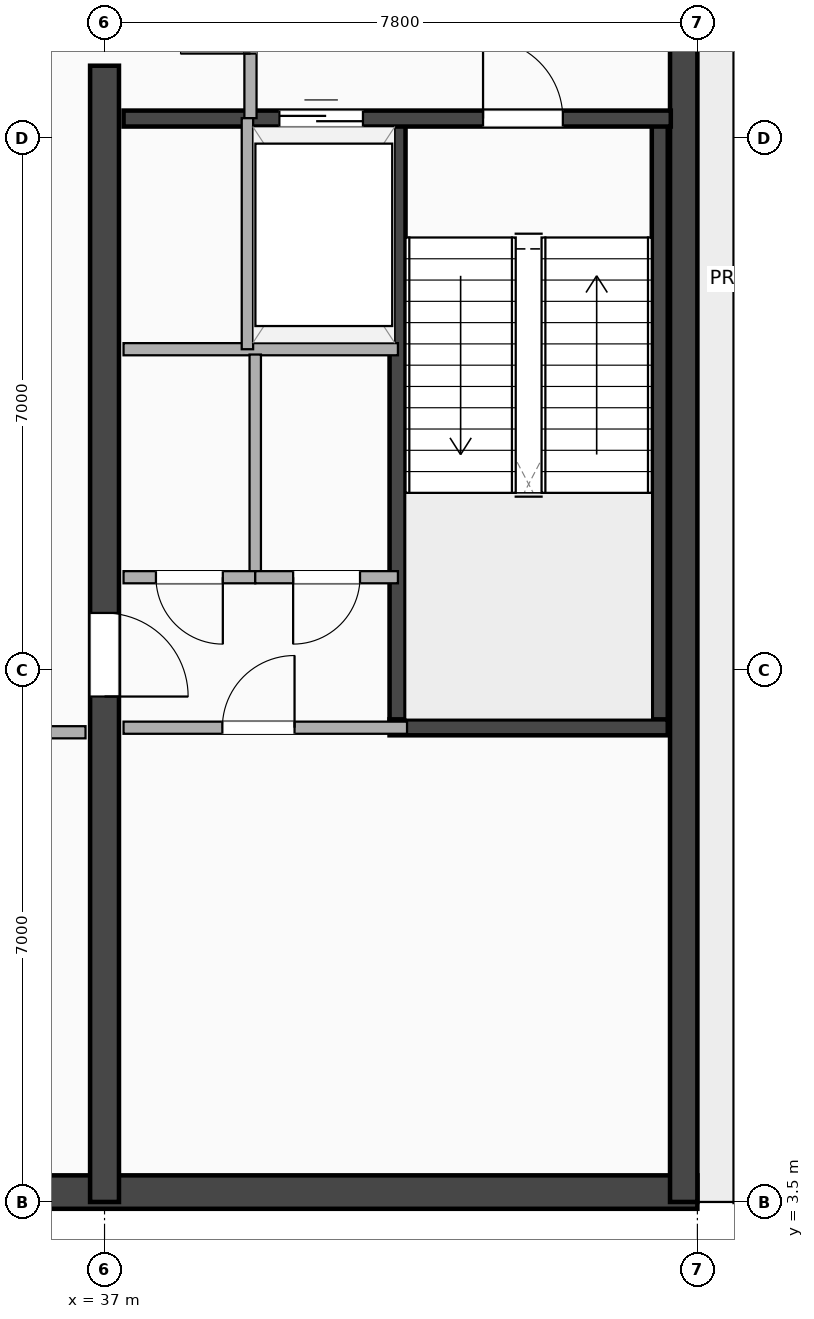
"""IFC4 building model, lengths in metres.
Left out: names, types, materials, properties, quantities, classifications, styles, units other than length and angle.
Written with IfcOpenShell. Run it as: python <this file> out.ifc"""

import sys

from ifc_helpers import new_model, si_unit, direction, frame, frame_2d, origin, place, context, subcontext, project, spatial, rectangle, extrude, element, fill, save


model = new_model("IFC4")
c1 = context("Model", 3, precision=1e-05, world=origin(), true_north=direction((0.0, 1.0)))
c2 = subcontext(c1, "Body", "Model", "MODEL_VIEW")
j1 = project(units=[si_unit("LENGTHUNIT", "METRE"), si_unit("PLANEANGLEUNIT", "RADIAN")], contexts=[c1])
p1 = place(None, origin())
s1 = spatial("IfcSite", under=j1, at=p1, CompositionType="ELEMENT")
p2 = place(p1, origin())
s2 = spatial("IfcBuilding", under=s1, at=p2, CompositionType="ELEMENT")
p3 = place(p2, frame((0.0, 0.0, 307.9)))
s3 = spatial("IfcBuildingStorey", under=s2, at=p3, CompositionType="ELEMENT", Elevation=307.9)
p4 = place(p3, frame((20.3, 3.63, 0.0), z_axis=(0.0, 0.0, 1.0), x_axis=(1.0, 0.0, 0.0)))
e1 = element("IfcWall", 1, at=p4, inside=s3, PredefinedType="SHEAR", context=c2, shape_type="SweptSolid", body=[
    extrude(rectangle(XDim=24.5, YDim=0.44, at=frame_2d((12.25, 0.0))), origin(), (0.0, 0.0, 1.0), 4.3),
])
p5 = place(p3, frame((44.62, 3.5, 0.0), z_axis=(0.0, 0.0, 1.0), x_axis=(0.0, 1.0, 0.0)))
e2 = element("IfcWall", 2, at=p5, inside=s3, PredefinedType="SHEAR", context=c2, shape_type="SweptSolid", body=[
    extrude(rectangle(XDim=22.3, YDim=0.36, at=frame_2d((11.15, 0.0))), origin(), (0.0, 0.0, 1.0), 4.3),
])
p6 = place(p3, frame((37.0, 3.5, 0.0), z_axis=(0.0, 0.0, 1.0), x_axis=(0.0, 1.0, 0.0)))
e3 = element("IfcWall", 3, at=p6, inside=s3, PredefinedType="SHEAR", context=c2, shape_type="SweptSolid", body=[
    extrude(rectangle(XDim=14.95, YDim=0.38, at=frame_2d((7.475, 0.0))), origin(), (0.0, 0.0, 1.0), 4.3),
])
p7 = place(p6, frame((6.65, 0.0, 0.0)))
e4 = element("IfcOpeningElement", 4, at=p7, cuts=e3, PredefinedType="OPENING", context=c2, shape_type="SweptSolid", body=[
    extrude(rectangle(XDim=1.1, YDim=2.15, at=frame_2d((0.55, 1.075))), frame((0.0, 0.2, 0.0), z_axis=(0.0, -1.0, 0.0), x_axis=(1.0, 0.0, 0.0)), (0.0, 0.0, 1.0), 0.4),
])
for number, where, z_axis, x_axis in (
    (5, (40.855, 9.745, 0.0), (0.0, 0.0, 1.0), (0.0, 1.0, 0.0)),
    (6, (44.305, 9.745, 0.0), (0.0, 0.0, 1.0), (0.0, 1.0, 0.0)),
):
    element("IfcWall", number, at=place(p3, frame(where, z_axis=z_axis, x_axis=x_axis)), inside=s3, PredefinedType="SHEAR", context=c2, shape_type="SweptSolid", body=[
        extrude(rectangle(XDim=8.01, YDim=0.21, at=frame_2d((4.005, 0.0))), origin(), (0.0, 0.0, 1.0), 4.3),
    ])
p8 = place(p3, frame((40.75, 9.745, 0.0), z_axis=(0.0, 0.0, 1.0), x_axis=(1.0, 0.0, 0.0)))
e7 = element("IfcWall", 7, at=p8, inside=s3, PredefinedType="SHEAR", context=c2, shape_type="SweptSolid", body=[
    extrude(rectangle(XDim=3.66, YDim=0.21, at=frame_2d((1.83, 0.0))), origin(), (0.0, 0.0, 1.0), 4.3),
])
p9 = place(p3, frame((37.25, 17.755, 0.0), z_axis=(0.0, 0.0, 1.0), x_axis=(1.0, 0.0, 0.0)))
e8 = element("IfcWall", 8, at=p9, inside=s3, PredefinedType="SHEAR", context=c2, shape_type="SweptSolid", body=[
    extrude(rectangle(XDim=7.2, YDim=0.21, at=frame_2d((3.6, 0.0))), origin(), (0.0, 0.0, 1.0), 4.3),
])
p10 = place(p9, frame((2.05, 0.0, 0.0)))
e9 = element("IfcOpeningElement", 9, at=p10, cuts=e8, PredefinedType="OPENING", context=c2, shape_type="SweptSolid", body=[
    extrude(rectangle(XDim=1.1, YDim=2.18, at=frame_2d((0.55, 1.09))), frame((0.0, 0.115, 0.0), z_axis=(0.0, -1.0, 0.0), x_axis=(1.0, 0.0, 0.0)), (0.0, 0.0, 1.0), 0.23),
])
p11 = place(p9, frame((5.78, 0.0, 0.0), z_axis=(0.0, 0.0, 1.0), x_axis=(-1.0, 0.0, 0.0)))
e10 = element("IfcOpeningElement", 10, at=p11, cuts=e8, PredefinedType="OPENING", context=c2, shape_type="SweptSolid", body=[
    extrude(rectangle(XDim=1.05, YDim=2.15, at=frame_2d((0.525, 1.075))), frame((0.0, 0.115, 0.0), z_axis=(0.0, -1.0, 0.0), x_axis=(1.0, 0.0, 0.0)), (0.0, 0.0, 1.0), 0.23),
])
p12 = place(p3, frame((45.41, 3.5, 0.0), z_axis=(0.0, 0.0, 1.0), x_axis=(0.0, 1.0, 0.0)))
e11 = element("IfcWall", 11, at=p12, inside=s3, PredefinedType="PARAPET", context=c2, shape_type="SweptSolid", body=[
    extrude(rectangle(XDim=23.6, YDim=0.24, at=frame_2d((11.8, 0.0))), origin(), (0.0, 0.0, 1.0), 1.25),
])
p13 = place(p3, frame((38.92, 17.76, 0.0), z_axis=(0.0, 0.0, 1.0), x_axis=(0.0, 1.0, 0.0)))
e12 = element("IfcWall", 12, at=p13, inside=s3, PredefinedType="PARTITIONING", context=c2, shape_type="SweptSolid", body=[
    extrude(rectangle(XDim=2.66, YDim=0.16, at=frame_2d((1.33, 0.0))), origin(), (0.0, 0.0, 1.0), 4.3),
])
p14 = place(p13, frame((1.77, 0.0, 0.0), z_axis=(0.0, 0.0, 1.0), x_axis=(-1.0, 0.0, 0.0)))
e13 = element("IfcOpeningElement", 13, at=p14, cuts=e12, PredefinedType="OPENING", context=c2, shape_type="SweptSolid", body=[
    extrude(rectangle(XDim=0.92, YDim=2.08, at=frame_2d((0.46, 1.04))), frame((0.0, 0.09, 0.0), z_axis=(0.0, -1.0, 0.0), x_axis=(1.0, 0.0, 0.0)), (0.0, 0.0, 1.0), 0.18),
])
p15 = place(p3, frame((37.25, 14.72, 0.0), z_axis=(0.0, 0.0, 1.0), x_axis=(1.0, 0.0, 0.0)))
e14 = element("IfcWall", 14, at=p15, inside=s3, PredefinedType="PARTITIONING", context=c2, shape_type="SweptSolid", body=[
    extrude(rectangle(XDim=3.61, YDim=0.16, at=frame_2d((1.805, 0.0))), origin(), (0.0, 0.0, 1.0), 4.3),
])
p16 = place(p3, frame((38.88, 14.72, 0.0), z_axis=(0.0, 0.0, 1.0), x_axis=(0.0, 1.0, 0.0)))
e15 = element("IfcWall", 15, at=p16, inside=s3, PredefinedType="PARTITIONING", context=c2, shape_type="SweptSolid", body=[
    extrude(rectangle(XDim=3.04, YDim=0.15, at=frame_2d((1.52, 0.0))), origin(), (0.0, 0.0, 1.0), 4.3),
])
p17 = place(p3, frame((38.983, 11.72, 0.0), z_axis=(0.0, 0.0, 1.0), x_axis=(0.0, 1.0, 0.0)))
e16 = element("IfcWall", 16, at=p17, inside=s3, PredefinedType="PARTITIONING", context=c2, shape_type="SweptSolid", body=[
    extrude(rectangle(XDim=2.93, YDim=0.15, at=frame_2d((1.465, 0.0))), origin(), (0.0, 0.0, 1.0), 4.3),
])
p18 = place(p3, frame((37.25, 11.72, 0.0), z_axis=(0.0, 0.0, 1.0), x_axis=(1.0, 0.0, 0.0)))
e17 = element("IfcWall", 17, at=p18, inside=s3, PredefinedType="PARTITIONING", context=c2, shape_type="SweptSolid", body=[
    extrude(rectangle(XDim=1.733, YDim=0.16, at=frame_2d((0.866, 0.0))), origin(), (0.0, 0.0, 1.0), 4.3),
])
p19 = place(p18, frame((0.427, 0.0, 0.0)))
e18 = element("IfcOpeningElement", 18, at=p19, cuts=e17, PredefinedType="OPENING", context=c2, shape_type="SweptSolid", body=[
    extrude(rectangle(XDim=0.88, YDim=2.08, at=frame_2d((0.44, 1.04))), frame((0.0, 0.09, 0.0), z_axis=(0.0, -1.0, 0.0), x_axis=(1.0, 0.0, 0.0)), (0.0, 0.0, 1.0), 0.18),
])
p20 = place(p3, frame((38.983, 11.72, 0.0), z_axis=(0.0, 0.0, 1.0), x_axis=(1.0, 0.0, 0.0)))
e19 = element("IfcWall", 19, at=p20, inside=s3, PredefinedType="PARTITIONING", context=c2, shape_type="SweptSolid", body=[
    extrude(rectangle(XDim=1.877, YDim=0.16, at=frame_2d((0.938, 0.0))), origin(), (0.0, 0.0, 1.0), 4.3),
])
p21 = place(p20, frame((0.499, 0.0, 0.0)))
e20 = element("IfcOpeningElement", 20, at=p21, cuts=e19, PredefinedType="OPENING", context=c2, shape_type="SweptSolid", body=[
    extrude(rectangle(XDim=0.88, YDim=2.08, at=frame_2d((0.44, 1.04))), frame((0.0, 0.09, 0.0), z_axis=(0.0, -1.0, 0.0), x_axis=(1.0, 0.0, 0.0)), (0.0, 0.0, 1.0), 0.18),
])
p22 = place(p3, frame((37.25, 9.74, 0.0), z_axis=(0.0, 0.0, 1.0), x_axis=(1.0, 0.0, 0.0)))
e21 = element("IfcWall", 21, at=p22, inside=s3, PredefinedType="PARTITIONING", context=c2, shape_type="SweptSolid", body=[
    extrude(rectangle(XDim=3.73, YDim=0.16, at=frame_2d((1.865, 0.0))), origin(), (0.0, 0.0, 1.0), 4.3),
])
p23 = place(p22, frame((2.25, 0.0, 0.0), z_axis=(0.0, 0.0, 1.0), x_axis=(-1.0, 0.0, 0.0)))
e22 = element("IfcOpeningElement", 22, at=p23, cuts=e21, PredefinedType="OPENING", context=c2, shape_type="SweptSolid", body=[
    extrude(rectangle(XDim=0.95, YDim=2.15, at=frame_2d((0.475, 1.075))), frame((0.0, 0.09, 0.0), z_axis=(0.0, -1.0, 0.0), x_axis=(1.0, 0.0, 0.0)), (0.0, 0.0, 1.0), 0.18),
])
p24 = place(p3, frame((29.45, 9.68, 0.0), z_axis=(0.0, 0.0, 1.0), x_axis=(1.0, 0.0, 0.0)))
e23 = element("IfcWall", 23, at=p24, inside=s3, PredefinedType="PARTITIONING", context=c2, shape_type="SweptSolid", body=[
    extrude(rectangle(XDim=7.3, YDim=0.16, at=frame_2d((3.65, 0.0))), origin(), (0.0, 0.0, 1.0), 4.3),
])
p25 = place(p24, frame((4.11, 0.0, 0.0), z_axis=(0.0, 0.0, 1.0), x_axis=(-1.0, 0.0, 0.0)))
e24 = element("IfcOpeningElement", 24, at=p25, cuts=e23, PredefinedType="OPENING", context=c2, shape_type="SweptSolid", body=[
    extrude(rectangle(XDim=0.92, YDim=2.08, at=frame_2d((0.46, 1.04))), frame((0.0, 0.09, 0.0), z_axis=(0.0, -1.0, 0.0), x_axis=(1.0, 0.0, 0.0)), (0.0, 0.0, 1.0), 0.18),
])
p26 = place(p10, origin())
e25 = element("IfcDoor", 25, at=p26, inside=s3, OperationType="DOUBLE_DOOR_SLIDING", PredefinedType="DOOR", context=c2, shape_type="SweptSolid", body=[
    extrude(rectangle(XDim=1.1, YDim=2.18, at=frame_2d((0.55, 1.09))), frame((0.0, 0.025, 0.0), z_axis=(0.0, -1.0, 0.0), x_axis=(1.0, 0.0, 0.0)), (0.0, 0.0, 1.0), 0.05),
])
fill(e9, e25)
p27 = place(p11, origin())
e26 = element("IfcDoor", 26, at=p27, inside=s3, OperationType="SINGLE_SWING_LEFT", PredefinedType="DOOR", context=c2, shape_type="SweptSolid", body=[
    extrude(rectangle(XDim=1.05, YDim=2.15, at=frame_2d((0.525, 1.075))), frame((0.0, 0.025, 0.0), z_axis=(0.0, -1.0, 0.0), x_axis=(1.0, 0.0, 0.0)), (0.0, 0.0, 1.0), 0.05),
])
fill(e10, e26)
p28 = place(p7, origin())
e27 = element("IfcDoor", 27, at=p28, inside=s3, OperationType="SINGLE_SWING_LEFT", PredefinedType="DOOR", context=c2, shape_type="SweptSolid", body=[
    extrude(rectangle(XDim=1.1, YDim=2.15, at=frame_2d((0.55, 1.075))), frame((0.0, 0.025, 0.0), z_axis=(0.0, -1.0, 0.0), x_axis=(1.0, 0.0, 0.0)), (0.0, 0.0, 1.0), 0.05),
])
fill(e4, e27)
p29 = place(p14, origin())
e28 = element("IfcDoor", 28, at=p29, inside=s3, OperationType="SINGLE_SWING_LEFT", PredefinedType="DOOR", context=c2, shape_type="SweptSolid", body=[
    extrude(rectangle(XDim=0.92, YDim=2.08, at=frame_2d((0.46, 1.04))), frame((0.0, 0.025, 0.0), z_axis=(0.0, -1.0, 0.0), x_axis=(1.0, 0.0, 0.0)), (0.0, 0.0, 1.0), 0.05),
])
fill(e13, e28)
p30 = place(p19, origin())
e29 = element("IfcDoor", 29, at=p30, inside=s3, OperationType="SINGLE_SWING_RIGHT", PredefinedType="DOOR", context=c2, shape_type="SweptSolid", body=[
    extrude(rectangle(XDim=0.88, YDim=2.08, at=frame_2d((0.44, 1.04))), frame((0.0, 0.025, 0.0), z_axis=(0.0, -1.0, 0.0), x_axis=(1.0, 0.0, 0.0)), (0.0, 0.0, 1.0), 0.05),
])
fill(e18, e29)
p31 = place(p21, origin())
e30 = element("IfcDoor", 30, at=p31, inside=s3, OperationType="SINGLE_SWING_LEFT", PredefinedType="DOOR", context=c2, shape_type="SweptSolid", body=[
    extrude(rectangle(XDim=0.88, YDim=2.08, at=frame_2d((0.44, 1.04))), frame((0.0, 0.025, 0.0), z_axis=(0.0, -1.0, 0.0), x_axis=(1.0, 0.0, 0.0)), (0.0, 0.0, 1.0), 0.05),
])
fill(e20, e30)
p32 = place(p23, origin())
e31 = element("IfcDoor", 31, at=p32, inside=s3, OperationType="SINGLE_SWING_RIGHT", PredefinedType="DOOR", context=c2, shape_type="SweptSolid", body=[
    extrude(rectangle(XDim=0.95, YDim=2.15, at=frame_2d((0.475, 1.075))), frame((0.0, 0.025, 0.0), z_axis=(0.0, -1.0, 0.0), x_axis=(1.0, 0.0, 0.0)), (0.0, 0.0, 1.0), 0.05),
])
fill(e22, e31)
save(model, sys.argv[1])
